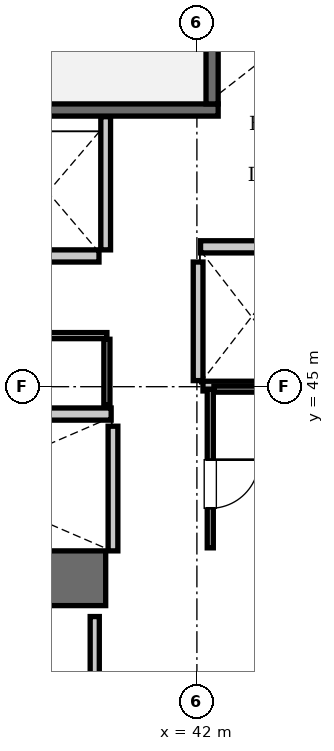
"""IFC4 building model, lengths in metres.
Left out: names, types, materials, properties, quantities, classifications, styles, units other than length and angle.
Written with IfcOpenShell. Run it as: python <this file> out.ifc"""

import sys

from ifc_helpers import new_model, si_unit, direction, frame, frame_2d, origin, place, context, subcontext, project, spatial, rectangle, extrude, element, fill, save


model = new_model("IFC4")
c1 = context("Model", 3, precision=1e-05, world=origin(), true_north=direction((0.0, 1.0)))
c2 = subcontext(c1, "Body", "Model", "MODEL_VIEW")
j1 = project(units=[si_unit("LENGTHUNIT", "METRE"), si_unit("PLANEANGLEUNIT", "RADIAN")], contexts=[c1])
p1 = place(None, origin())
s1 = spatial("IfcSite", under=j1, at=p1, CompositionType="ELEMENT")
p2 = place(p1, origin())
s2 = spatial("IfcBuilding", under=s1, at=p2, CompositionType="ELEMENT")
p3 = place(p2, frame((0.0, 0.0, 61.6)))
s3 = spatial("IfcBuildingStorey", under=s2, at=p3, CompositionType="ELEMENT", Elevation=61.6)
p4 = place(p3, frame((35.1, 41.85, 0.0), z_axis=(0.0, 0.0, 1.0), x_axis=(1.0, 0.0, 0.0)))
e1 = element("IfcWall", 1, at=p4, inside=s3, PredefinedType="SHEAR", context=c2, shape_type="SweptSolid", body=[
    extrude(rectangle(XDim=5.4, YDim=0.9, at=frame_2d((2.7, 0.0))), origin(), (0.0, 0.0, 1.0), 3.85),
])
p5 = place(p3, frame((33.25, 49.55, 0.0), z_axis=(0.0, 0.0, 1.0), x_axis=(1.0, 0.0, 0.0)))
e2 = element("IfcWall", 2, at=p5, inside=s3, PredefinedType="SOLIDWALL", context=c2, shape_type="SweptSolid", body=[
    extrude(rectangle(XDim=9.1, YDim=0.2, at=frame_2d((4.55, 0.0))), origin(), (0.0, 0.0, 1.0), 3.61),
])
p6 = place(p3, frame((42.25, 49.65, 0.0), z_axis=(0.0, 0.0, 1.0), x_axis=(0.0, 1.0, 0.0)))
e3 = element("IfcWall", 3, at=p6, inside=s3, PredefinedType="SOLIDWALL", context=c2, shape_type="SweptSolid", body=[
    extrude(rectangle(XDim=3.45, YDim=0.2, at=frame_2d((1.725, 0.0))), origin(), (0.0, 0.0, 1.0), 3.61),
])
p7 = place(p3, frame((42.06, 47.3, 0.0), z_axis=(0.0, 0.0, 1.0), x_axis=(1.0, 0.0, 0.0)))
e4 = element("IfcWall", 4, at=p7, inside=s3, PredefinedType="SOLIDWALL", context=c2, shape_type="SweptSolid", body=[
    extrude(rectangle(XDim=1.68, YDim=0.2, at=frame_2d((0.84, 0.0))), origin(), (0.0, 0.0, 1.0), 3.61),
])
p8 = place(p3, frame((38.91, 44.55, 0.0), z_axis=(0.0, 0.0, 1.0), x_axis=(1.0, 0.0, 0.0)))
e5 = element("IfcWall", 5, at=p8, inside=s3, PredefinedType="SOLIDWALL", context=c2, shape_type="SweptSolid", body=[
    extrude(rectangle(XDim=1.68, YDim=0.2, at=frame_2d((0.84, 0.0))), origin(), (0.0, 0.0, 1.0), 3.61),
])
p9 = place(p3, frame((38.71, 47.15, 0.0), z_axis=(0.0, 0.0, 1.0), x_axis=(1.0, 0.0, 0.0)))
e6 = element("IfcWall", 6, at=p9, inside=s3, PredefinedType="SOLIDWALL", context=c2, shape_type="SweptSolid", body=[
    extrude(rectangle(XDim=1.68, YDim=0.2, at=frame_2d((0.84, 0.0))), origin(), (0.0, 0.0, 1.0), 3.61),
])
p10 = place(p3, frame((42.02, 45.1, 0.0), z_axis=(0.0, 0.0, 1.0), x_axis=(0.0, 1.0, 0.0)))
e7 = element("IfcWall", 7, at=p10, inside=s3, PredefinedType="SOLIDWALL", context=c2, shape_type="SweptSolid", body=[
    extrude(rectangle(XDim=1.95, YDim=0.16, at=frame_2d((0.975, 0.0))), origin(), (0.0, 0.0, 1.0), 3.61),
])
p11 = place(p3, frame((42.1, 45.01, 0.0), z_axis=(0.0, 0.0, 1.0), x_axis=(1.0, 0.0, 0.0)))
e8 = element("IfcWall", 8, at=p11, inside=s3, PredefinedType="SOLIDWALL", context=c2, shape_type="SweptSolid", body=[
    extrude(rectangle(XDim=3.45, YDim=0.16, at=frame_2d((1.725, 0.0))), origin(), (0.0, 0.0, 1.0), 3.61),
])
p12 = place(p3, frame((40.62, 42.3, 0.0), z_axis=(0.0, 0.0, 1.0), x_axis=(0.0, 1.0, 0.0)))
e9 = element("IfcWall", 9, at=p12, inside=s3, PredefinedType="SOLIDWALL", context=c2, shape_type="SweptSolid", body=[
    extrude(rectangle(XDim=2.05, YDim=0.16, at=frame_2d((1.025, 0.0))), origin(), (0.0, 0.0, 1.0), 3.61),
])
p13 = place(p3, frame((40.5, 47.25, 0.0), z_axis=(0.0, 0.0, 1.0), x_axis=(0.0, 1.0, 0.0)))
e10 = element("IfcWall", 10, at=p13, inside=s3, PredefinedType="SOLIDWALL", context=c2, shape_type="SweptSolid", body=[
    extrude(rectangle(XDim=2.19, YDim=0.16, at=frame_2d((1.095, 0.0))), origin(), (0.0, 0.0, 1.0), 3.61),
])
p14 = place(p3, frame((38.02, 45.84, 0.0), z_axis=(0.0, 0.0, 1.0), x_axis=(1.0, 0.0, 0.0)))
e11 = element("IfcWall", 11, at=p14, inside=s3, PredefinedType="PARTITIONING", context=c2, shape_type="SweptSolid", body=[
    extrude(rectangle(XDim=2.5, YDim=0.1, at=frame_2d((1.25, 0.0))), origin(), (0.0, 0.0, 1.0), 3.61),
])
p15 = place(p14, frame((0.75, 0.0, 0.0)))
e12 = element("IfcOpeningElement", 12, at=p15, cuts=e11, PredefinedType="OPENING", context=c2, shape_type="SweptSolid", body=[
    extrude(rectangle(XDim=0.8, YDim=2.05, at=frame_2d((0.4, 1.025))), frame((0.0, 0.06, 0.0), z_axis=(0.0, -1.0, 0.0), x_axis=(1.0, 0.0, 0.0)), (0.0, 0.0, 1.0), 0.12),
])
p16 = place(p3, frame((40.52, 44.7, 0.0), z_axis=(0.0, 0.0, 1.0), x_axis=(0.0, 1.0, 0.0)))
e13 = element("IfcWall", 13, at=p16, inside=s3, PredefinedType="PARTITIONING", context=c2, shape_type="SweptSolid", body=[
    extrude(rectangle(XDim=1.08, YDim=0.1, at=frame_2d((0.54, 0.0))), origin(), (0.0, 0.0, 1.0), 3.61),
])
p17 = place(p3, frame((42.22, 42.35, 0.0), z_axis=(0.0, 0.0, 1.0), x_axis=(0.0, 1.0, 0.0)))
e14 = element("IfcWall", 14, at=p17, inside=s3, PredefinedType="PARTITIONING", context=c2, shape_type="SweptSolid", body=[
    extrude(rectangle(XDim=2.61, YDim=0.1, at=frame_2d((1.305, 0.0))), origin(), (0.0, 0.0, 1.0), 3.61),
])
p18 = place(p17, frame((0.65, 0.0, 0.0)))
e15 = element("IfcOpeningElement", 15, at=p18, cuts=e14, PredefinedType="OPENING", context=c2, shape_type="SweptSolid", body=[
    extrude(rectangle(XDim=0.8, YDim=2.05, at=frame_2d((0.4, 1.025))), frame((0.0, 0.06, 0.0), z_axis=(0.0, -1.0, 0.0), x_axis=(1.0, 0.0, 0.0)), (0.0, 0.0, 1.0), 0.12),
])
p19 = place(p3, frame((42.28, 44.96, 0.0), z_axis=(0.0, 0.0, 1.0), x_axis=(1.0, 0.0, 0.0)))
e16 = element("IfcWall", 16, at=p19, inside=s3, PredefinedType="PARTITIONING", context=c2, shape_type="SweptSolid", body=[
    extrude(rectangle(XDim=1.3, YDim=0.1, at=frame_2d((0.65, 0.0))), origin(), (0.0, 0.0, 1.0), 3.61),
])
p20 = place(p3, frame((40.32, 38.38, 0.0), z_axis=(0.0, 0.0, 1.0), x_axis=(0.0, 1.0, 0.0)))
e17 = element("IfcWall", 17, at=p20, inside=s3, PredefinedType="PARTITIONING", context=c2, shape_type="SweptSolid", body=[
    extrude(rectangle(XDim=2.84, YDim=0.15, at=frame_2d((1.42, 0.0))), origin(), (0.0, 0.0, 1.0), 3.61),
])
p21 = place(p18, frame((0.8, 0.0, 0.0), z_axis=(0.0, 0.0, 1.0), x_axis=(-1.0, 0.0, 0.0)))
e18 = element("IfcDoor", 18, at=p21, inside=s3, OperationType="SINGLE_SWING_LEFT", PredefinedType="DOOR", context=c2, shape_type="SweptSolid", body=[
    extrude(rectangle(XDim=0.8, YDim=2.05, at=frame_2d((0.4, 1.025))), frame((0.0, 0.025, 0.0), z_axis=(0.0, -1.0, 0.0), x_axis=(1.0, 0.0, 0.0)), (0.0, 0.0, 1.0), 0.05),
])
fill(e15, e18)
save(model, sys.argv[1])
